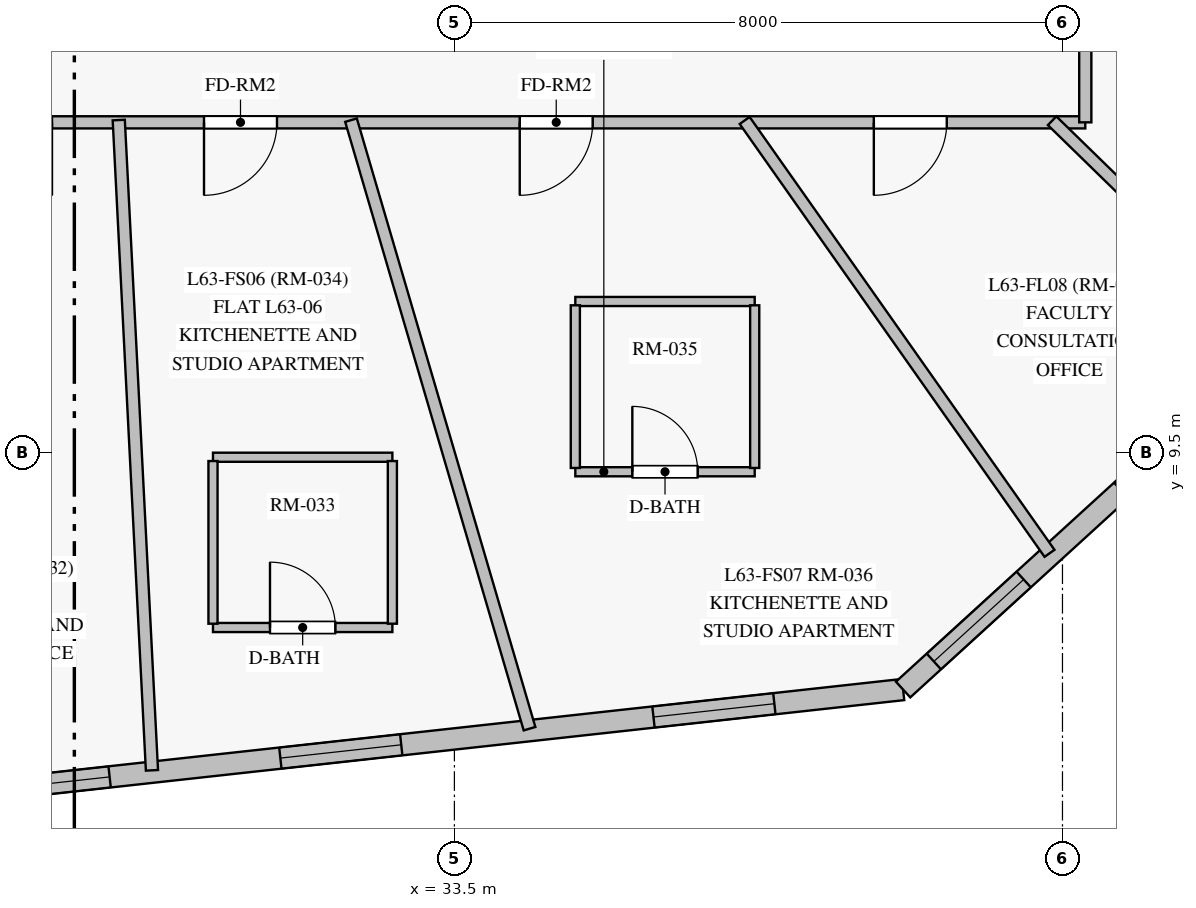
"""IFC4 building model, lengths in metres.
Left out: names, types, materials, properties, quantities, classifications, styles, units other than length and angle.
Written with IfcOpenShell. Run it as: python <this file> out.ifc"""

import sys

from ifc_helpers import new_model, si_unit, direction, frame, frame_2d, origin, origin_with_axes, place, context, subcontext, project, spatial, rectangle, extrude, source, transform, mapped, element, fill, save


model = new_model("IFC4")
c1 = context("Model", 3, precision=1e-05, world=origin(), true_north=direction((0.0, 1.0)))
c2 = subcontext(c1, "Body", "Model", "MODEL_VIEW")
j1 = project(units=[si_unit("LENGTHUNIT", "METRE"), si_unit("PLANEANGLEUNIT", "RADIAN")], contexts=[c1])
p1 = place(None, origin())
s1 = spatial("IfcSite", under=j1, at=p1, CompositionType="ELEMENT")
p2 = place(p1, origin())
s2 = spatial("IfcBuilding", under=s1, at=p2, CompositionType="ELEMENT")
p3 = place(p2, frame((0.0, 0.0, 216.9)))
s3 = spatial("IfcBuildingStorey", under=s2, at=p3, CompositionType="ELEMENT", Elevation=216.9)
p4 = place(p3, frame((26.752, 4.995, 0.0), z_axis=(0.0, 0.0, 1.0), x_axis=(0.993993885495, 0.10943562308, 0.0)))
e1 = element("IfcWall", 1, at=p4, inside=s3, PredefinedType="SOLIDWALL", context=c2, shape_type="SweptSolid", body=[
    extrude(rectangle(XDim=12.727, YDim=0.28, at=frame_2d((6.364, 0.0))), origin(), (0.0, 0.0, 1.0), 2.85),
])
p5 = place(p4, frame((0.625, 0.0, 0.85)))
e2 = element("IfcOpeningElement", 2, at=p5, cuts=e1, PredefinedType="OPENING", context=c2, shape_type="SweptSolid", body=[
    extrude(rectangle(XDim=1.6, YDim=1.6, at=frame_2d((0.8, 0.8))), frame((0.0, 0.15, 0.0), z_axis=(0.0, -1.0, 0.0), x_axis=(1.0, 0.0, 0.0)), (0.0, 0.0, 1.0), 0.3),
])
p6 = place(p4, frame((4.485, 0.0, 0.85)))
e3 = element("IfcOpeningElement", 3, at=p6, cuts=e1, PredefinedType="OPENING", context=c2, shape_type="SweptSolid", body=[
    extrude(rectangle(XDim=1.6, YDim=1.6, at=frame_2d((0.8, 0.8))), frame((0.0, 0.15, 0.0), z_axis=(0.0, -1.0, 0.0), x_axis=(1.0, 0.0, 0.0)), (0.0, 0.0, 1.0), 0.3),
])
p7 = place(p4, frame((9.423, 0.0, 0.85)))
e4 = element("IfcOpeningElement", 4, at=p7, cuts=e1, PredefinedType="OPENING", context=c2, shape_type="SweptSolid", body=[
    extrude(rectangle(XDim=1.6, YDim=1.6, at=frame_2d((0.8, 0.8))), frame((0.0, 0.15, 0.0), z_axis=(0.0, -1.0, 0.0), x_axis=(1.0, 0.0, 0.0)), (0.0, 0.0, 1.0), 0.3),
])
p8 = place(p3, frame((39.403, 6.388, 0.0), z_axis=(0.0, 0.0, 1.0), x_axis=(0.738681440001, 0.674054693774, 0.0)))
e5 = element("IfcWall", 5, at=p8, inside=s3, PredefinedType="SOLIDWALL", context=c2, shape_type="SweptSolid", body=[
    extrude(rectangle(XDim=9.682, YDim=0.28, at=frame_2d((4.841, 0.0))), origin(), (0.0, 0.0, 1.0), 2.85),
])
p9 = place(p8, frame((0.548, 0.0, 0.85)))
e6 = element("IfcOpeningElement", 6, at=p9, cuts=e5, PredefinedType="OPENING", context=c2, shape_type="SweptSolid", body=[
    extrude(rectangle(XDim=1.6, YDim=1.6, at=frame_2d((0.8, 0.8))), frame((0.0, 0.15, 0.0), z_axis=(0.0, -1.0, 0.0), x_axis=(1.0, 0.0, 0.0)), (0.0, 0.0, 1.0), 0.3),
])
p10 = place(p8, frame((3.885, 0.0, 0.85)))
e7 = element("IfcOpeningElement", 7, at=p10, cuts=e5, PredefinedType="OPENING", context=c2, shape_type="SweptSolid", body=[
    extrude(rectangle(XDim=1.6, YDim=1.6, at=frame_2d((0.8, 0.8))), frame((0.0, 0.15, 0.0), z_axis=(0.0, -1.0, 0.0), x_axis=(1.0, 0.0, 0.0)), (0.0, 0.0, 1.0), 0.3),
])
p11 = place(p8, frame((7.378, 0.0, 0.85)))
e8 = element("IfcOpeningElement", 8, at=p11, cuts=e5, PredefinedType="OPENING", context=c2, shape_type="SweptSolid", body=[
    extrude(rectangle(XDim=1.6, YDim=1.6, at=frame_2d((0.8, 0.8))), frame((0.0, 0.15, 0.0), z_axis=(0.0, -1.0, 0.0), x_axis=(1.0, 0.0, 0.0)), (0.0, 0.0, 1.0), 0.3),
])
p12 = place(p3, frame((41.8, 13.85, 0.0), z_axis=(0.0, 0.0, 1.0), x_axis=(-1.0, 0.0, 0.0)))
e9 = element("IfcWall", 9, at=p12, inside=s3, PredefinedType="PARTITIONING", context=c2, shape_type="SweptSolid", body=[
    extrude(rectangle(XDim=25.05, YDim=0.16, at=frame_2d((12.525, 0.0))), origin(), (0.0, 0.0, 1.0), 2.3),
])
p13 = place(p12, frame((10.634, 0.0, 0.0)))
e10 = element("IfcOpeningElement", 10, at=p13, cuts=e9, PredefinedType="OPENING", context=c2, shape_type="SweptSolid", body=[
    extrude(rectangle(XDim=0.96, YDim=2.15, at=frame_2d((0.48, 1.075))), frame((0.0, 0.09, 0.0), z_axis=(0.0, -1.0, 0.0), x_axis=(1.0, 0.0, 0.0)), (0.0, 0.0, 1.0), 0.18),
])
p14 = place(p12, frame((6.48, 0.0, 0.0)))
e11 = element("IfcOpeningElement", 11, at=p14, cuts=e9, PredefinedType="OPENING", context=c2, shape_type="SweptSolid", body=[
    extrude(rectangle(XDim=0.96, YDim=2.15, at=frame_2d((0.48, 1.075))), frame((0.0, 0.09, 0.0), z_axis=(0.0, -1.0, 0.0), x_axis=(1.0, 0.0, 0.0)), (0.0, 0.0, 1.0), 0.18),
])
p15 = place(p12, frame((18.752, 0.0, 0.0)))
e12 = element("IfcOpeningElement", 12, at=p15, cuts=e9, PredefinedType="OPENING", context=c2, shape_type="SweptSolid", body=[
    extrude(rectangle(XDim=0.96, YDim=2.15, at=frame_2d((0.48, 1.075))), frame((0.0, 0.09, 0.0), z_axis=(0.0, -1.0, 0.0), x_axis=(1.0, 0.0, 0.0)), (0.0, 0.0, 1.0), 0.18),
])
p16 = place(p12, frame((15.808, 0.0, 0.0)))
e13 = element("IfcOpeningElement", 13, at=p16, cuts=e9, PredefinedType="OPENING", context=c2, shape_type="SweptSolid", body=[
    extrude(rectangle(XDim=0.96, YDim=2.15, at=frame_2d((0.48, 1.075))), frame((0.0, 0.09, 0.0), z_axis=(0.0, -1.0, 0.0), x_axis=(1.0, 0.0, 0.0)), (0.0, 0.0, 1.0), 0.18),
])
p17 = place(p12, frame((13.594, 0.0, 0.0)))
e14 = element("IfcOpeningElement", 14, at=p17, cuts=e9, PredefinedType="OPENING", context=c2, shape_type="SweptSolid", body=[
    extrude(rectangle(XDim=0.96, YDim=2.15, at=frame_2d((0.48, 1.075))), frame((0.0, 0.09, 0.0), z_axis=(0.0, -1.0, 0.0), x_axis=(1.0, 0.0, 0.0)), (0.0, 0.0, 1.0), 0.18),
])
p18 = place(p12, frame((1.822, 0.0, 0.0)))
e15 = element("IfcOpeningElement", 15, at=p18, cuts=e9, PredefinedType="OPENING", context=c2, shape_type="SweptSolid", body=[
    extrude(rectangle(XDim=0.96, YDim=2.15, at=frame_2d((0.48, 1.075))), frame((0.0, 0.09, 0.0), z_axis=(0.0, -1.0, 0.0), x_axis=(1.0, 0.0, 0.0)), (0.0, 0.0, 1.0), 0.18),
])
p19 = place(p3, frame((41.8, 33.45, 0.0), z_axis=(0.0, 0.0, 1.0), x_axis=(0.0, -1.0, 0.0)))
e16 = element("IfcWall", 16, at=p19, inside=s3, PredefinedType="PARTITIONING", context=c2, shape_type="SweptSolid", body=[
    extrude(rectangle(XDim=19.6, YDim=0.16, at=frame_2d((9.8, 0.0))), origin(), (0.0, 0.0, 1.0), 2.3),
])
p20 = place(p19, frame((15.3, 0.0, 0.0)))
e17 = element("IfcOpeningElement", 17, at=p20, cuts=e16, PredefinedType="OPENING", context=c2, shape_type="SweptSolid", body=[
    extrude(rectangle(XDim=0.96, YDim=2.15, at=frame_2d((0.48, 1.075))), frame((0.0, 0.09, 0.0), z_axis=(0.0, -1.0, 0.0), x_axis=(1.0, 0.0, 0.0)), (0.0, 0.0, 1.0), 0.18),
])
p21 = place(p19, frame((9.325, 0.0, 0.0)))
e18 = element("IfcOpeningElement", 18, at=p21, cuts=e16, PredefinedType="OPENING", context=c2, shape_type="SweptSolid", body=[
    extrude(rectangle(XDim=0.96, YDim=2.15, at=frame_2d((0.48, 1.075))), frame((0.0, 0.09, 0.0), z_axis=(0.0, -1.0, 0.0), x_axis=(1.0, 0.0, 0.0)), (0.0, 0.0, 1.0), 0.18),
])
p22 = place(p19, frame((6.385, 0.0, 0.0)))
e19 = element("IfcOpeningElement", 19, at=p22, cuts=e16, PredefinedType="OPENING", context=c2, shape_type="SweptSolid", body=[
    extrude(rectangle(XDim=0.96, YDim=2.15, at=frame_2d((0.48, 1.075))), frame((0.0, 0.09, 0.0), z_axis=(0.0, -1.0, 0.0), x_axis=(1.0, 0.0, 0.0)), (0.0, 0.0, 1.0), 0.18),
])
p23 = place(p3, frame((29.084, 13.88, 0.0), z_axis=(0.0, 0.0, 1.0), x_axis=(0.050989521913, -0.998699188272, 0.0)))
e20 = element("IfcWall", 20, at=p23, inside=s3, PredefinedType="PARTITIONING", context=c2, shape_type="SweptSolid", body=[
    extrude(rectangle(XDim=8.566, YDim=0.16, at=frame_2d((4.283, 0.0))), origin(), (0.0, 0.0, 1.0), 2.85),
])
p24 = place(p3, frame((32.14, 13.879, 0.0), z_axis=(0.0, 0.0, 1.0), x_axis=(0.281466023859, -0.959571194552, 0.0)))
e21 = element("IfcWall", 21, at=p24, inside=s3, PredefinedType="PARTITIONING", context=c2, shape_type="SweptSolid", body=[
    extrude(rectangle(XDim=8.344, YDim=0.16, at=frame_2d((4.172, 0.0))), origin(), (0.0, 0.0, 1.0), 2.85),
])
p25 = place(p3, frame((37.319, 13.875, 0.0), z_axis=(0.0, 0.0, 1.0), x_axis=(0.575840662362, -0.817561943568, 0.0)))
e22 = element("IfcWall", 22, at=p25, inside=s3, PredefinedType="PARTITIONING", context=c2, shape_type="SweptSolid", body=[
    extrude(rectangle(XDim=6.965, YDim=0.16, at=frame_2d((3.482, 0.0))), origin(), (0.0, 0.0, 1.0), 2.85),
])
p26 = place(p3, frame((41.364, 13.871, 0.0), z_axis=(0.0, 0.0, 1.0), x_axis=(0.715911992073, -0.698190532453, 0.0)))
e23 = element("IfcWall", 23, at=p26, inside=s3, PredefinedType="PARTITIONING", context=c2, shape_type="SweptSolid", body=[
    extrude(rectangle(XDim=4.188, YDim=0.16, at=frame_2d((2.094, 0.0))), origin(), (0.0, 0.0, 1.0), 2.85),
])
p27 = place(p3, frame((35.091, 9.253, 0.0), z_axis=(0.0, 0.0, 1.0), x_axis=(1.0, 0.0, 0.0)))
e24 = element("IfcWall", 24, at=p27, inside=s3, PredefinedType="PARTITIONING", context=c2, shape_type="SweptSolid", body=[
    extrude(rectangle(XDim=2.36, YDim=0.12, at=frame_2d((1.18, 0.0))), origin(), (0.0, 0.0, 1.0), 2.85),
])
p28 = place(p27, frame((0.75, 0.0, 0.0)))
e25 = element("IfcOpeningElement", 25, at=p28, cuts=e24, PredefinedType="OPENING", context=c2, shape_type="SweptSolid", body=[
    extrude(rectangle(XDim=0.86, YDim=2.1, at=frame_2d((0.43, 1.05))), frame((0.0, 0.07, 0.0), z_axis=(0.0, -1.0, 0.0), x_axis=(1.0, 0.0, 0.0)), (0.0, 0.0, 1.0), 0.14),
])
p29 = place(p3, frame((37.451, 11.493, 0.0), z_axis=(0.0, 0.0, 1.0), x_axis=(-1.0, 0.0, 0.0)))
e26 = element("IfcWall", 26, at=p29, inside=s3, PredefinedType="PARTITIONING", context=c2, shape_type="SweptSolid", body=[
    extrude(rectangle(XDim=2.36, YDim=0.12, at=frame_2d((1.18, 0.0))), origin(), (0.0, 0.0, 1.0), 2.85),
])
p30 = place(p3, frame((30.324, 7.204, 0.0), z_axis=(0.0, 0.0, 1.0), x_axis=(1.0, 0.0, 0.0)))
e27 = element("IfcWall", 27, at=p30, inside=s3, PredefinedType="PARTITIONING", context=c2, shape_type="SweptSolid", body=[
    extrude(rectangle(XDim=2.36, YDim=0.12, at=frame_2d((1.18, 0.0))), origin(), (0.0, 0.0, 1.0), 2.85),
])
p31 = place(p30, frame((0.75, 0.0, 0.0)))
e28 = element("IfcOpeningElement", 28, at=p31, cuts=e27, PredefinedType="OPENING", context=c2, shape_type="SweptSolid", body=[
    extrude(rectangle(XDim=0.86, YDim=2.1, at=frame_2d((0.43, 1.05))), frame((0.0, 0.07, 0.0), z_axis=(0.0, -1.0, 0.0), x_axis=(1.0, 0.0, 0.0)), (0.0, 0.0, 1.0), 0.14),
])
p32 = place(p3, frame((32.684, 9.444, 0.0), z_axis=(0.0, 0.0, 1.0), x_axis=(-1.0, 0.0, 0.0)))
e29 = element("IfcWall", 29, at=p32, inside=s3, PredefinedType="PARTITIONING", context=c2, shape_type="SweptSolid", body=[
    extrude(rectangle(XDim=2.36, YDim=0.12, at=frame_2d((1.18, 0.0))), origin(), (0.0, 0.0, 1.0), 2.85),
])
for number, where, z_axis, x_axis in (
    (30, (32.684, 7.254, 0.0), (0.0, 0.0, 1.0), (0.0, 1.0, 0.0)),
    (31, (30.324, 9.394, 0.0), (0.0, 0.0, 1.0), (0.0, -1.0, 0.0)),
    (32, (37.451, 9.303, 0.0), (0.0, 0.0, 1.0), (0.0, 1.0, 0.0)),
    (33, (35.091, 11.443, 0.0), (0.0, 0.0, 1.0), (0.0, -1.0, 0.0)),
):
    element("IfcWall", number, at=place(p3, frame(where, z_axis=z_axis, x_axis=x_axis)), inside=s3, PredefinedType="PARTITIONING", context=c2, shape_type="SweptSolid", body=[
        extrude(rectangle(XDim=2.14, YDim=0.12, at=frame_2d((1.07, 0.0))), origin(), (0.0, 0.0, 1.0), 2.85),
    ])
m1 = source(origin_with_axes(), c2, "Body", "SweptSolid", [
    extrude(rectangle(XDim=1.6, YDim=1.6, at=frame_2d((0.8, 0.8))), frame((0.0, 0.03, 0.0), z_axis=(0.0, -1.0, 0.0), x_axis=(1.0, 0.0, 0.0)), (0.0, 0.0, 1.0), 0.06),
])
p33 = place(p5, origin())
e34 = element("IfcWindow", 34, at=p33, inside=s3, PartitioningType="SINGLE_PANEL", PredefinedType="WINDOW", context=c2, shape_type="MappedRepresentation", body=[
    mapped(m1, transform((0.0, 0.0, 0.0), scale=1.0)),
])
fill(e2, e34)
p34 = place(p6, origin())
e35 = element("IfcWindow", 35, at=p34, inside=s3, PartitioningType="SINGLE_PANEL", PredefinedType="WINDOW", context=c2, shape_type="MappedRepresentation", body=[
    mapped(m1, transform((0.0, 0.0, 0.0), scale=1.0)),
])
fill(e3, e35)
p35 = place(p7, origin())
e36 = element("IfcWindow", 36, at=p35, inside=s3, PartitioningType="SINGLE_PANEL", PredefinedType="WINDOW", context=c2, shape_type="MappedRepresentation", body=[
    mapped(m1, transform((0.0, 0.0, 0.0), scale=1.0)),
])
fill(e4, e36)
p36 = place(p9, origin())
e37 = element("IfcWindow", 37, at=p36, inside=s3, PartitioningType="SINGLE_PANEL", PredefinedType="WINDOW", context=c2, shape_type="MappedRepresentation", body=[
    mapped(m1, transform((0.0, 0.0, 0.0), scale=1.0)),
])
fill(e6, e37)
m2 = source(origin_with_axes(), c2, "Body", "SweptSolid", [
    extrude(rectangle(XDim=0.86, YDim=2.1, at=frame_2d((0.43, 1.05))), frame((0.0, 0.025, 0.0), z_axis=(0.0, -1.0, 0.0), x_axis=(1.0, 0.0, 0.0)), (0.0, 0.0, 1.0), 0.05),
])
p37 = place(p31, origin())
e38 = element("IfcDoor", 38, at=p37, inside=s3, OperationType="SINGLE_SWING_LEFT", PredefinedType="DOOR", context=c2, shape_type="MappedRepresentation", body=[
    mapped(m2, transform((0.0, 0.0, 0.0), scale=1.0)),
])
fill(e28, e38)
m3 = source(origin_with_axes(), c2, "Body", "SweptSolid", [
    extrude(rectangle(XDim=0.96, YDim=2.15, at=frame_2d((0.48, 1.075))), frame((0.0, 0.025, 0.0), z_axis=(0.0, -1.0, 0.0), x_axis=(1.0, 0.0, 0.0)), (0.0, 0.0, 1.0), 0.05),
])
p38 = place(p13, origin())
e39 = element("IfcDoor", 39, at=p38, inside=s3, OperationType="SINGLE_SWING_RIGHT", PredefinedType="DOOR", context=c2, shape_type="MappedRepresentation", body=[
    mapped(m3, transform((0.0, 0.0, 0.0), scale=1.0)),
])
fill(e10, e39)
p39 = place(p28, origin())
e40 = element("IfcDoor", 40, at=p39, inside=s3, OperationType="SINGLE_SWING_LEFT", PredefinedType="DOOR", context=c2, shape_type="MappedRepresentation", body=[
    mapped(m2, transform((0.0, 0.0, 0.0), scale=1.0)),
])
fill(e25, e40)
p40 = place(p14, origin())
e41 = element("IfcDoor", 41, at=p40, inside=s3, OperationType="SINGLE_SWING_RIGHT", PredefinedType="DOOR", context=c2, shape_type="MappedRepresentation", body=[
    mapped(m3, transform((0.0, 0.0, 0.0), scale=1.0)),
])
fill(e11, e41)
p41 = place(p18, origin())
e42 = element("IfcDoor", 42, at=p41, inside=s3, OperationType="SINGLE_SWING_RIGHT", PredefinedType="DOOR", context=c2, shape_type="MappedRepresentation", body=[
    mapped(m3, transform((0.0, 0.0, 0.0), scale=1.0)),
])
fill(e15, e42)
save(model, sys.argv[1])
